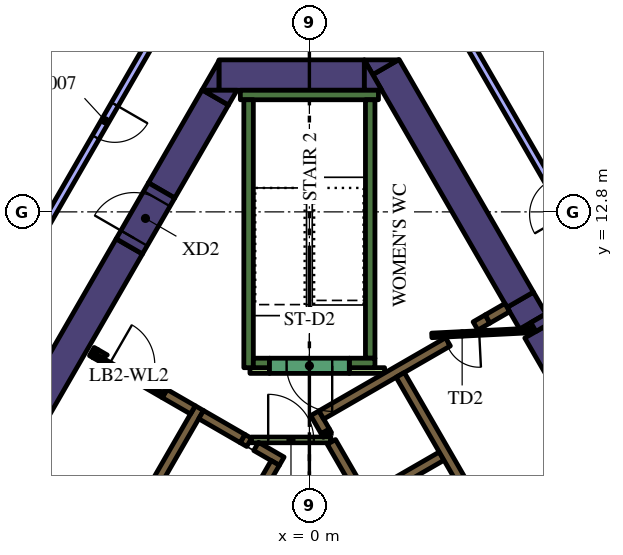
"""IFC4 building model, lengths in metres.
Left out: names, types, materials, properties, quantities, classifications, styles, units other than length and angle.
Written with IfcOpenShell. Run it as: python <this file> out.ifc"""

import sys

from ifc_helpers import new_model, si_unit, direction, frame, frame_2d, origin, place, context, subcontext, project, spatial, polyline, rectangle, outline, extrude, element, fill, save


model = new_model("IFC4")
c1 = context("Model", 3, precision=1e-05, world=origin(), true_north=direction((0.0, 1.0)))
c2 = subcontext(c1, "Body", "Model", "MODEL_VIEW")
j1 = project(units=[si_unit("LENGTHUNIT", "METRE"), si_unit("PLANEANGLEUNIT", "RADIAN")], contexts=[c1])
p1 = place(None, origin())
s1 = spatial("IfcSite", under=j1, at=p1, CompositionType="ELEMENT")
p2 = place(p1, origin())
s2 = spatial("IfcBuilding", under=s1, at=p2, CompositionType="ELEMENT")
p3 = place(p2, frame((0.0, 0.0, 187.8)))
s3 = spatial("IfcBuildingStorey", under=s2, at=p3, CompositionType="ELEMENT", Elevation=187.8)
p4 = place(p3, frame((5.878, 9.918, 0.0), z_axis=(0.0, 0.0, 1.0), x_axis=(-0.499893918903, 0.866086641072, 0.0)))
e1 = element("IfcWall", 1, at=p4, inside=s3, PredefinedType="SOLIDWALL", context=c2, shape_type="SweptSolid", body=[
    extrude(rectangle(XDim=0.657, YDim=0.8, at=frame_2d((0.329, 0.0))), origin(), (0.0, 0.0, 1.0), 4.2),
])
p5 = place(p3, frame((8.279, 5.761, 0.0), z_axis=(0.0, 0.0, 1.0), x_axis=(-0.500024261398, 0.866011396007, 0.0)))
e2 = element("IfcWall", 2, at=p5, inside=s3, PredefinedType="SOLIDWALL", context=c2, shape_type="SweptSolid", body=[
    extrude(rectangle(XDim=4.528, YDim=0.8, at=frame_2d((2.264, 0.0))), origin(), (0.0, 0.0, 1.0), 4.2),
])
p6 = place(p3, origin())
e3 = element("IfcWall", 3, at=p6, inside=s3, PredefinedType="SOLIDWALL", context=c2, shape_type="SweptSolid", body=[
    extrude(outline(polyline([(5.961, 9.654), (5.827, 9.886), (6.226, 10.116), (6.36, 9.884), (5.961, 9.654)])), origin(), (0.0, 0.0, 1.0), 4.2),
])
p7 = place(p3, frame((5.549, 10.489, 0.0), z_axis=(0.0, 0.0, 1.0), x_axis=(-0.50001746176, 0.866015321998, 0.0)))
e4 = element("IfcWall", 4, at=p7, inside=s3, PredefinedType="SOLIDWALL", context=c2, shape_type="SweptSolid", body=[
    extrude(rectangle(XDim=7.068, YDim=0.8, at=frame_2d((3.534, 0.0))), origin(), (0.0, 0.0, 1.0), 4.2),
])
e5 = element("IfcWall", 5, at=p6, inside=s3, PredefinedType="SOLIDWALL", context=c2, shape_type="SweptSolid", body=[
    extrude(outline(polyline([(1.443, 16.8), (2.339, 16.8), (1.667, 16.412), (1.443, 16.8)])), origin(), (0.0, 0.0, 1.0), 4.2),
])
p8 = place(p3, frame((-2.379, 16.4, 0.0), z_axis=(0.0, 0.0, 1.0), x_axis=(1.0, 0.0, 0.0)))
e6 = element("IfcWall", 6, at=p8, inside=s3, PredefinedType="SOLIDWALL", context=c2, shape_type="SweptSolid", body=[
    extrude(rectangle(XDim=3.824, YDim=0.8, at=frame_2d((1.912, 0.0))), origin(), (0.0, 0.0, 1.0), 4.2),
])
e7 = element("IfcWall", 7, at=p6, inside=s3, PredefinedType="SOLIDWALL", context=c2, shape_type="SweptSolid", body=[
    extrude(outline(polyline([(1.905, 16.0), (1.447, 16.0), (1.447, 16.793), (1.905, 16.0)])), origin(), (0.0, 0.0, 1.0), 4.2),
])
e8 = element("IfcWall", 8, at=p6, inside=s3, PredefinedType="SOLIDWALL", context=c2, shape_type="SweptSolid", body=[
    extrude(outline(polyline([(-2.829, 16.0), (-2.381, 16.776), (-2.381, 16.0), (-2.829, 16.0)])), origin(), (0.0, 0.0, 1.0), 4.2),
])
p9 = place(p3, frame((-2.477, 15.81, 0.0), z_axis=(0.0, 0.0, 1.0), x_axis=(-0.499969377405, -0.866043083026, 0.0)))
e9 = element("IfcWall", 9, at=p9, inside=s3, PredefinedType="SOLIDWALL", context=c2, shape_type="SweptSolid", body=[
    extrude(rectangle(XDim=2.824, YDim=0.8, at=frame_2d((1.412, 0.0))), origin(), (0.0, 0.0, 1.0), 4.2),
])
e10 = element("IfcWall", 10, at=p6, inside=s3, PredefinedType="SOLIDWALL", context=c2, shape_type="SweptSolid", body=[
    extrude(outline(polyline([(-1.905, 16.0), (-2.129, 15.612), (-2.801, 16.0), (-1.905, 16.0)])), origin(), (0.0, 0.0, 1.0), 4.2),
])
p10 = place(p3, frame((-12.668, -1.842, 0.0), z_axis=(0.0, 0.0, 1.0), x_axis=(0.500003640647, 0.866023301845, 0.0)))
e11 = element("IfcWall", 11, at=p10, inside=s3, PredefinedType="SOLIDWALL", context=c2, shape_type="SweptSolid", body=[
    extrude(rectangle(XDim=15.858, YDim=0.8, at=frame_2d((7.929, 0.0))), origin(), (0.0, 0.0, 1.0), 4.2),
])
p11 = place(p3, frame((-1.817, 15.875, 0.0), z_axis=(0.0, 0.0, 1.0), x_axis=(1.0, 0.0, 0.0)))
e12 = element("IfcWall", 12, at=p11, inside=s3, PredefinedType="SOLIDWALL", context=c2, shape_type="SweptSolid", body=[
    extrude(rectangle(XDim=3.634, YDim=0.25, at=frame_2d((1.817, 0.0))), origin(), (0.0, 0.0, 1.0), 4.2),
])
p12 = place(p3, frame((1.6, 8.95, 0.0), z_axis=(0.0, 0.0, 1.0), x_axis=(0.0, 1.0, 0.0)))
e13 = element("IfcWall", 13, at=p12, inside=s3, PredefinedType="SOLIDWALL", context=c2, shape_type="SweptSolid", body=[
    extrude(rectangle(XDim=6.8, YDim=0.25, at=frame_2d((3.4, 0.0))), origin(), (0.0, 0.0, 1.0), 4.2),
])
p13 = place(p3, frame((1.05, 8.825, 0.0), z_axis=(0.0, 0.0, 1.0), x_axis=(1.0, 0.0, 0.0)))
e14 = element("IfcWall", 14, at=p13, inside=s3, PredefinedType="SOLIDWALL", context=c2, shape_type="SweptSolid", body=[
    extrude(rectangle(XDim=0.675, YDim=0.25, at=frame_2d((0.337, 0.0))), origin(), (0.0, 0.0, 1.0), 4.2),
])
p14 = place(p3, frame((-1.6, 8.7, 0.0), z_axis=(0.0, 0.0, 1.0), x_axis=(0.0, 1.0, 0.0)))
e15 = element("IfcWall", 15, at=p14, inside=s3, PredefinedType="SOLIDWALL", context=c2, shape_type="SweptSolid", body=[
    extrude(rectangle(XDim=7.05, YDim=0.25, at=frame_2d((3.525, 0.0))), origin(), (0.0, 0.0, 1.0), 4.2),
])
p15 = place(p3, frame((-1.475, 8.825, 0.0), z_axis=(0.0, 0.0, 1.0), x_axis=(1.0, 0.0, 0.0)))
e16 = element("IfcWall", 16, at=p15, inside=s3, PredefinedType="SOLIDWALL", context=c2, shape_type="SweptSolid", body=[
    extrude(rectangle(XDim=0.425, YDim=0.25, at=frame_2d((0.212, 0.0))), origin(), (0.0, 0.0, 1.0), 4.2),
])
p16 = place(p3, frame((0.473, 6.93, 0.0), z_axis=(0.0, 0.0, 1.0), x_axis=(-0.49972245349, 0.866185586049, 0.0)))
e17 = element("IfcWall", 17, at=p16, inside=s3, PredefinedType="SOLIDWALL", context=c2, shape_type="SweptSolid", body=[
    extrude(rectangle(XDim=0.11, YDim=0.25, at=frame_2d((0.055, 0.0))), origin(), (0.0, 0.0, 1.0), 4.2),
])
p17 = place(p3, frame((6.568, -3.627, 0.0), z_axis=(0.0, 0.0, 1.0), x_axis=(-0.499999455981, 0.866025717874, 0.0)))
e18 = element("IfcWall", 18, at=p17, inside=s3, PredefinedType="SOLIDWALL", context=c2, shape_type="SweptSolid", body=[
    extrude(rectangle(XDim=11.978, YDim=0.25, at=frame_2d((5.989, 0.0))), origin(), (0.0, 0.0, 1.0), 4.2),
])
p18 = place(p3, frame((0.417, 7.027, 0.0), z_axis=(0.0, 0.0, 1.0), x_axis=(-0.500210807569, 0.865903659763, 0.0)))
e19 = element("IfcWall", 19, at=p18, inside=s3, PredefinedType="SOLIDWALL", context=c2, shape_type="SweptSolid", body=[
    extrude(rectangle(XDim=0.548, YDim=0.25, at=frame_2d((0.274, 0.0))), origin(), (0.0, 0.0, 1.0), 4.2),
])
p19 = place(p3, frame((3.647, 9.38, 0.0), z_axis=(0.0, 0.0, 1.0), x_axis=(-0.866025015791, -0.500000672024, 0.0)))
e20 = element("IfcWall", 20, at=p19, inside=s3, PredefinedType="SOLIDWALL", context=c2, shape_type="SweptSolid", body=[
    extrude(rectangle(XDim=3.849, YDim=0.25, at=frame_2d((1.924, 0.0))), origin(), (0.0, 0.0, 1.0), 4.2),
])
p20 = place(p3, frame((1.574, 5.274, 0.0), z_axis=(0.0, 0.0, 1.0), x_axis=(0.866028486751, 0.499994660107, 0.0)))
e21 = element("IfcWall", 21, at=p20, inside=s3, PredefinedType="SOLIDWALL", context=c2, shape_type="SweptSolid", body=[
    extrude(rectangle(XDim=2.2, YDim=0.25, at=frame_2d((1.1, 0.0))), origin(), (0.0, 0.0, 1.0), 4.2),
])
p21 = place(p3, frame((4.688, 9.981, 0.0), z_axis=(0.0, 0.0, 1.0), x_axis=(-0.865974312977, -0.500088481434, 0.0)))
e22 = element("IfcWall", 22, at=p21, inside=s3, PredefinedType="SOLIDWALL", context=c2, shape_type="SweptSolid", body=[
    extrude(rectangle(XDim=0.366, YDim=0.25, at=frame_2d((0.183, 0.0))), origin(), (0.0, 0.0, 1.0), 4.2),
])
p22 = place(p3, frame((4.689, 9.982, 0.0), z_axis=(0.0, 0.0, 1.0), x_axis=(0.865947592822, 0.500134748329, 0.0)))
e23 = element("IfcWall", 23, at=p22, inside=s3, PredefinedType="SOLIDWALL", context=c2, shape_type="SweptSolid", body=[
    extrude(rectangle(XDim=0.598, YDim=0.25, at=frame_2d((0.299, 0.0))), origin(), (0.0, 0.0, 1.0), 4.2),
])
p23 = place(p3, frame((-8.06, -1.311, 0.0), z_axis=(0.0, 0.0, 1.0), x_axis=(0.50000273126, 0.866023826885, 0.0)))
e24 = element("IfcWall", 24, at=p23, inside=s3, PredefinedType="SOLIDWALL", context=c2, shape_type="SweptSolid", body=[
    extrude(rectangle(XDim=10.33, YDim=0.25, at=frame_2d((5.165, 0.0))), origin(), (0.0, 0.0, 1.0), 4.2),
])
p24 = place(p3, frame((-1.758, 6.835, 0.0), z_axis=(0.0, 0.0, 1.0), x_axis=(0.865982457891, -0.500074377092, 0.0)))
e25 = element("IfcWall", 25, at=p24, inside=s3, PredefinedType="SOLIDWALL", context=c2, shape_type="SweptSolid", body=[
    extrude(rectangle(XDim=0.2, YDim=0.25, at=frame_2d((0.1, 0.0))), origin(), (0.0, 0.0, 1.0), 4.2),
])
p25 = place(p3, frame((-1.76, 6.836, 0.0), z_axis=(0.0, 0.0, 1.0), x_axis=(-0.865952863304, 0.500125622755, 0.0)))
e26 = element("IfcWall", 26, at=p25, inside=s3, PredefinedType="SOLIDWALL", context=c2, shape_type="SweptSolid", body=[
    extrude(rectangle(XDim=1.258, YDim=0.25, at=frame_2d((0.629, 0.0))), origin(), (0.0, 0.0, 1.0), 4.2),
])
p26 = place(p3, frame((-0.728, 6.24, 0.0), z_axis=(0.0, 0.0, 1.0), x_axis=(-0.865955664968, 0.500120771724, 0.0)))
e27 = element("IfcWall", 27, at=p26, inside=s3, PredefinedType="SOLIDWALL", context=c2, shape_type="SweptSolid", body=[
    extrude(rectangle(XDim=0.778, YDim=0.25, at=frame_2d((0.389, 0.0))), origin(), (0.0, 0.0, 1.0), 4.2),
])
p27 = place(p3, frame((-5.725, 9.125, 0.0), z_axis=(0.0, 0.0, 1.0), x_axis=(0.866185586049, -0.49972245349, 0.0)))
e28 = element("IfcWall", 28, at=p27, inside=s3, PredefinedType="SOLIDWALL", context=c2, shape_type="SweptSolid", body=[
    extrude(rectangle(XDim=0.11, YDim=0.25, at=frame_2d((0.055, 0.0))), origin(), (0.0, 0.0, 1.0), 4.2),
])
p28 = place(p3, frame((-3.066, 7.59, 0.0), z_axis=(0.0, 0.0, 1.0), x_axis=(-0.866081358704, 0.49990307071, 0.0)))
e29 = element("IfcWall", 29, at=p28, inside=s3, PredefinedType="SOLIDWALL", context=c2, shape_type="SweptSolid", body=[
    extrude(rectangle(XDim=0.858, YDim=0.25, at=frame_2d((0.429, 0.0))), origin(), (0.0, 0.0, 1.0), 4.2),
])
e30 = element("IfcWall", 30, at=p6, inside=s3, PredefinedType="SOLIDWALL", context=c2, shape_type="SweptSolid", body=[
    extrude(outline(polyline([(-3.748, 8.128), (-3.813, 8.015), (-4.027, 8.139), (-4.017, 8.156), (-4.008, 8.173), (-4.0, 8.192), (-3.995, 8.21), (-3.991, 8.23), (-3.99, 8.25), (-3.99, 8.268), (-3.748, 8.128)])), origin(), (0.0, 0.0, 1.0), 4.2),
])
e31 = element("IfcWall", 31, at=p6, inside=s3, PredefinedType="SOLIDWALL", context=c2, shape_type="SweptSolid", body=[
    extrude(outline(polyline([(-5.689, 8.96), (-5.69, 8.961), (-5.565, 9.177), (-5.319, 9.035), (-5.335, 9.026), (-5.351, 9.015), (-5.366, 9.002), (-5.379, 8.988), (-5.392, 8.972), (-5.402, 8.956), (-5.412, 8.939), (-5.629, 9.064), (-5.629, 9.064), (-5.689, 8.96)])), origin(), (0.0, 0.0, 1.0), 4.2),
])
p29 = place(p3, frame((1.05, 8.625, 0.0), z_axis=(0.0, 0.0, 1.0), x_axis=(1.0, 0.0, 0.0)))
e32 = element("IfcWall", 32, at=p29, inside=s3, PredefinedType="PARTITIONING", context=c2, shape_type="SweptSolid", body=[
    extrude(rectangle(XDim=0.929, YDim=0.15, at=frame_2d((0.464, 0.0))), origin(), (0.0, 0.0, 1.0), 3.15),
])
p30 = place(p3, frame((-1.564, 8.625, 0.0), z_axis=(0.0, 0.0, 1.0), x_axis=(1.0, 0.0, 0.0)))
e33 = element("IfcWall", 33, at=p30, inside=s3, PredefinedType="PARTITIONING", context=c2, shape_type="SweptSolid", body=[
    extrude(rectangle(XDim=0.514, YDim=0.15, at=frame_2d((0.257, 0.0))), origin(), (0.0, 0.0, 1.0), 3.15),
])
p31 = place(p3, frame((8.565, -2.185, 0.0), z_axis=(0.0, 0.0, 1.0), x_axis=(-0.499997954832, 0.866026584559, 0.0)))
e34 = element("IfcWall", 34, at=p31, inside=s3, PredefinedType="SOLIDWALL", context=c2, shape_type="SweptSolid", body=[
    extrude(rectangle(XDim=12.35, YDim=0.25, at=frame_2d((6.175, 0.0))), origin(), (0.0, 0.0, 1.0), 4.2),
])
p32 = place(p31, frame((0.585, 0.0, 0.0)))
e35 = element("IfcOpeningElement", 35, at=p32, cuts=e34, PredefinedType="OPENING", context=c2, shape_type="SweptSolid", body=[
    extrude(rectangle(XDim=1.1, YDim=2.1, at=frame_2d((0.55, 1.05))), frame((0.0, 0.135, 0.0), z_axis=(0.0, -1.0, 0.0), x_axis=(1.0, 0.0, 0.0)), (0.0, 0.0, 1.0), 0.27),
])
p33 = place(p3, frame((-0.898, 6.194, 0.0), z_axis=(0.0, 0.0, 1.0), x_axis=(-0.499996202215, -0.866027596426, 0.0)))
e36 = element("IfcWall", 36, at=p33, inside=s3, PredefinedType="SOLIDWALL", context=c2, shape_type="SweptSolid", body=[
    extrude(rectangle(XDim=9.83, YDim=0.25, at=frame_2d((4.915, 0.0))), origin(), (0.0, 0.0, 1.0), 4.2),
])
p34 = place(p33, frame((0.585, 0.0, 0.0)))
e37 = element("IfcOpeningElement", 37, at=p34, cuts=e36, PredefinedType="OPENING", context=c2, shape_type="SweptSolid", body=[
    extrude(rectangle(XDim=1.1, YDim=2.1, at=frame_2d((0.55, 1.05))), frame((0.0, 0.135, 0.0), z_axis=(0.0, -1.0, 0.0), x_axis=(1.0, 0.0, 0.0)), (0.0, 0.0, 1.0), 0.27),
])
p35 = place(p33, frame((3.105, 0.0, 0.0)))
e38 = element("IfcOpeningElement", 38, at=p35, cuts=e36, PredefinedType="OPENING", context=c2, shape_type="SweptSolid", body=[
    extrude(rectangle(XDim=1.1, YDim=2.1, at=frame_2d((0.55, 1.05))), frame((0.0, 0.135, 0.0), z_axis=(0.0, -1.0, 0.0), x_axis=(1.0, 0.0, 0.0)), (0.0, 0.0, 1.0), 0.27),
])
p36 = place(p33, frame((5.625, 0.0, 0.0)))
e39 = element("IfcOpeningElement", 39, at=p36, cuts=e36, PredefinedType="OPENING", context=c2, shape_type="SweptSolid", body=[
    extrude(rectangle(XDim=1.1, YDim=2.1, at=frame_2d((0.55, 1.05))), frame((0.0, 0.135, 0.0), z_axis=(0.0, -1.0, 0.0), x_axis=(1.0, 0.0, 0.0)), (0.0, 0.0, 1.0), 0.27),
])
p37 = place(p33, frame((8.145, 0.0, 0.0)))
e40 = element("IfcOpeningElement", 40, at=p37, cuts=e36, PredefinedType="OPENING", context=c2, shape_type="SweptSolid", body=[
    extrude(rectangle(XDim=1.1, YDim=2.1, at=frame_2d((0.55, 1.05))), frame((0.0, 0.135, 0.0), z_axis=(0.0, -1.0, 0.0), x_axis=(1.0, 0.0, 0.0)), (0.0, 0.0, 1.0), 0.27),
])
p38 = place(p3, frame((1.05, 8.75, 0.0), z_axis=(0.0, 0.0, 1.0), x_axis=(-1.0, 0.0, 0.0)))
e41 = element("IfcWall", 41, at=p38, inside=s3, PredefinedType="SOLIDWALL", context=c2, shape_type="SweptSolid", body=[
    extrude(rectangle(XDim=2.1, YDim=0.4, at=frame_2d((1.05, 0.0))), origin(), (0.0, 0.0, 1.0), 4.2),
])
p39 = place(p38, frame((0.45, 0.0, 0.0)))
e42 = element("IfcOpeningElement", 42, at=p39, cuts=e41, PredefinedType="OPENING", context=c2, shape_type="SweptSolid", body=[
    extrude(rectangle(XDim=1.2, YDim=2.1, at=frame_2d((0.6, 1.05))), frame((0.0, 0.21, 0.0), z_axis=(0.0, -1.0, 0.0), x_axis=(1.0, 0.0, 0.0)), (0.0, 0.0, 1.0), 0.42),
])
p40 = place(p3, frame((5.917, 9.684, 0.0), z_axis=(0.0, 0.0, 1.0), x_axis=(-0.998758194515, -0.049820366212, 0.0)))
e43 = element("IfcWall", 43, at=p40, inside=s3, PredefinedType="PARTITIONING", context=c2, shape_type="SweptSolid", body=[
    extrude(rectangle(XDim=2.7, YDim=0.12, at=frame_2d((1.35, 0.0))), origin(), (0.0, 0.0, 1.0), 3.15),
])
p41 = place(p40, frame((1.45, 0.0, 0.0)))
e44 = element("IfcOpeningElement", 44, at=p41, cuts=e43, PredefinedType="OPENING", context=c2, shape_type="SweptSolid", body=[
    extrude(rectangle(XDim=0.9, YDim=2.1, at=frame_2d((0.45, 1.05))), frame((0.0, 0.07, 0.0), z_axis=(0.0, -1.0, 0.0), x_axis=(1.0, 0.0, 0.0)), (0.0, 0.0, 1.0), 0.14),
])
p42 = place(p3, frame((-1.534, 6.8, 0.0), z_axis=(0.0, 0.0, 1.0), x_axis=(1.0, 0.0, 0.0)))
e45 = element("IfcWall", 45, at=p42, inside=s3, PredefinedType="PARTITIONING", context=c2, shape_type="SweptSolid", body=[
    extrude(rectangle(XDim=2.1, YDim=0.15, at=frame_2d((1.05, 0.0))), origin(), (0.0, 0.0, 1.0), 3.15),
])
p43 = place(p42, frame((0.45, 0.0, 0.0)))
e46 = element("IfcOpeningElement", 46, at=p43, cuts=e45, PredefinedType="OPENING", context=c2, shape_type="SweptSolid", body=[
    extrude(rectangle(XDim=1.2, YDim=2.1, at=frame_2d((0.6, 1.05))), frame((0.0, 0.085, 0.0), z_axis=(0.0, -1.0, 0.0), x_axis=(1.0, 0.0, 0.0)), (0.0, 0.0, 1.0), 0.17),
])
p44 = place(p3, frame((-5.659, 9.012, 0.0), z_axis=(0.0, 0.0, 1.0), x_axis=(0.866009402589, -0.500027713859, 0.0)))
e47 = element("IfcWall", 47, at=p44, inside=s3, PredefinedType="PARTITIONING", context=c2, shape_type="SweptSolid", body=[
    extrude(rectangle(XDim=2.1, YDim=0.12, at=frame_2d((1.05, 0.0))), origin(), (0.0, 0.0, 1.0), 3.15),
])
p45 = place(p44, frame((0.45, 0.0, 0.0)))
e48 = element("IfcOpeningElement", 48, at=p45, cuts=e47, PredefinedType="OPENING", context=c2, shape_type="SweptSolid", body=[
    extrude(rectangle(XDim=1.2, YDim=2.1, at=frame_2d((0.6, 1.05))), frame((0.0, 0.07, 0.0), z_axis=(0.0, -1.0, 0.0), x_axis=(1.0, 0.0, 0.0)), (0.0, 0.0, 1.0), 0.14),
])
p46 = place(p3, frame((-4.739, 11.892, 0.0), z_axis=(0.0, 0.0, 1.0), x_axis=(0.500062241894, 0.865989465428, 0.0)))
e49 = element("IfcWall", 49, at=p46, inside=s3, PredefinedType="SOLIDWALL", context=c2, shape_type="SweptSolid", body=[
    extrude(rectangle(XDim=1.7, YDim=0.8, at=frame_2d((0.85, 0.0))), origin(), (0.0, 0.0, 1.0), 4.2),
])
p47 = place(p46, frame((0.25, 0.0, 0.0)))
e50 = element("IfcOpeningElement", 50, at=p47, cuts=e49, PredefinedType="OPENING", context=c2, shape_type="SweptSolid", body=[
    extrude(rectangle(XDim=1.2, YDim=2.1, at=frame_2d((0.6, 1.05))), frame((0.0, 0.41, 0.0), z_axis=(0.0, -1.0, 0.0), x_axis=(1.0, 0.0, 0.0)), (0.0, 0.0, 1.0), 0.82),
])
p48 = place(p3, frame((8.844, 9.182, 0.0), z_axis=(0.0, 0.0, 1.0), x_axis=(-0.50000000053, 0.866025403479, 0.0)))
e51 = element("IfcWall", 51, at=p48, inside=s3, PredefinedType="PARTITIONING", context=c2, shape_type="SweptSolid", body=[
    extrude(rectangle(XDim=9.188, YDim=0.2, at=frame_2d((4.594, 0.0))), origin(), (0.0, 0.0, 1.0), 3.15),
])
p49 = place(p48, frame((4.1, 0.0, 0.0)))
e52 = element("IfcOpeningElement", 52, at=p49, cuts=e51, PredefinedType="OPENING", context=c2, shape_type="SweptSolid", body=[
    extrude(rectangle(XDim=1.0, YDim=2.1, at=frame_2d((0.5, 1.05))), frame((0.0, 0.11, 0.0), z_axis=(0.0, -1.0, 0.0), x_axis=(1.0, 0.0, 0.0)), (0.0, 0.0, 1.0), 0.22),
])
p50 = place(p3, frame((-3.421, 18.574, 0.0), z_axis=(0.0, 0.0, 1.0), x_axis=(-0.499989434416, -0.866031503741, 0.0)))
e53 = element("IfcWall", 53, at=p50, inside=s3, PredefinedType="PARTITIONING", context=c2, shape_type="SweptSolid", body=[
    extrude(rectangle(XDim=7.863, YDim=0.2, at=frame_2d((3.932, 0.0))), origin(), (0.0, 0.0, 1.0), 3.15),
])
p51 = place(p50, frame((3.4, 0.0, 0.0)))
e54 = element("IfcOpeningElement", 54, at=p51, cuts=e53, PredefinedType="OPENING", context=c2, shape_type="SweptSolid", body=[
    extrude(rectangle(XDim=1.0, YDim=2.1, at=frame_2d((0.5, 1.05))), frame((0.0, 0.11, 0.0), z_axis=(0.0, -1.0, 0.0), x_axis=(1.0, 0.0, 0.0)), (0.0, 0.0, 1.0), 0.22),
])
p52 = place(p39, origin())
e55 = element("IfcDoor", 55, at=p52, inside=s3, OperationType="SINGLE_SWING_LEFT", PredefinedType="DOOR", context=c2, shape_type="SweptSolid", body=[
    extrude(rectangle(XDim=1.2, YDim=2.1, at=frame_2d((0.6, 1.05))), frame((0.0, 0.025, 0.0), z_axis=(0.0, -1.0, 0.0), x_axis=(1.0, 0.0, 0.0)), (0.0, 0.0, 1.0), 0.05),
])
fill(e42, e55)
p53 = place(p41, origin())
e56 = element("IfcDoor", 56, at=p53, inside=s3, OperationType="SINGLE_SWING_LEFT", PredefinedType="DOOR", context=c2, shape_type="SweptSolid", body=[
    extrude(rectangle(XDim=0.9, YDim=2.1, at=frame_2d((0.45, 1.05))), frame((0.0, 0.025, 0.0), z_axis=(0.0, -1.0, 0.0), x_axis=(1.0, 0.0, 0.0)), (0.0, 0.0, 1.0), 0.05),
])
fill(e44, e56)
p54 = place(p43, origin())
e57 = element("IfcDoor", 57, at=p54, inside=s3, OperationType="SINGLE_SWING_LEFT", PredefinedType="DOOR", context=c2, shape_type="SweptSolid", body=[
    extrude(rectangle(XDim=1.2, YDim=2.1, at=frame_2d((0.6, 1.05))), frame((0.0, 0.025, 0.0), z_axis=(0.0, -1.0, 0.0), x_axis=(1.0, 0.0, 0.0)), (0.0, 0.0, 1.0), 0.05),
])
fill(e46, e57)
p55 = place(p45, origin())
e58 = element("IfcDoor", 58, at=p55, inside=s3, OperationType="SINGLE_SWING_LEFT", PredefinedType="DOOR", context=c2, shape_type="SweptSolid", body=[
    extrude(rectangle(XDim=1.2, YDim=2.1, at=frame_2d((0.6, 1.05))), frame((0.0, 0.025, 0.0), z_axis=(0.0, -1.0, 0.0), x_axis=(1.0, 0.0, 0.0)), (0.0, 0.0, 1.0), 0.05),
])
fill(e48, e58)
p56 = place(p47, origin())
e59 = element("IfcDoor", 59, at=p56, inside=s3, OperationType="SINGLE_SWING_LEFT", PredefinedType="DOOR", context=c2, shape_type="SweptSolid", body=[
    extrude(rectangle(XDim=1.2, YDim=2.1, at=frame_2d((0.6, 1.05))), frame((0.0, 0.025, 0.0), z_axis=(0.0, -1.0, 0.0), x_axis=(1.0, 0.0, 0.0)), (0.0, 0.0, 1.0), 0.05),
])
fill(e50, e59)
p57 = place(p51, origin())
e60 = element("IfcDoor", 60, at=p57, inside=s3, OperationType="SINGLE_SWING_LEFT", PredefinedType="DOOR", context=c2, shape_type="SweptSolid", body=[
    extrude(rectangle(XDim=1.0, YDim=2.1, at=frame_2d((0.5, 1.05))), frame((0.0, 0.025, 0.0), z_axis=(0.0, -1.0, 0.0), x_axis=(1.0, 0.0, 0.0)), (0.0, 0.0, 1.0), 0.05),
])
fill(e54, e60)
save(model, sys.argv[1])
